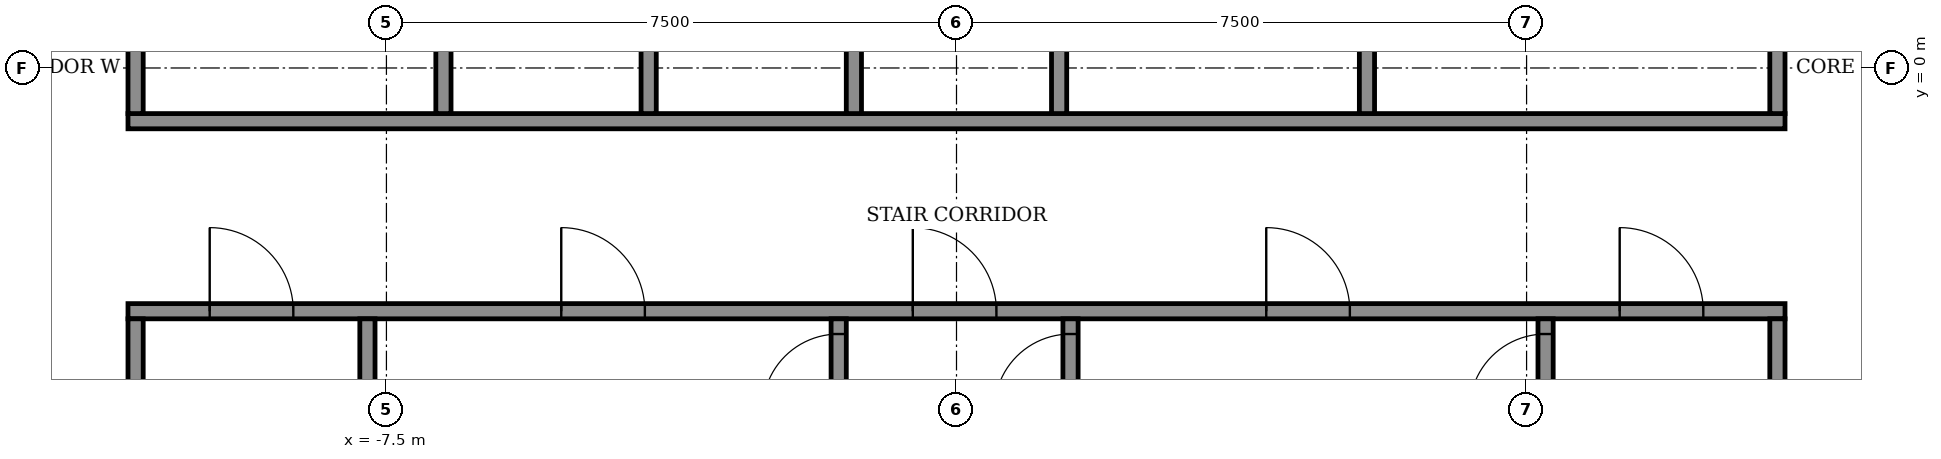
"""IFC4 building model, lengths in metres.
Left out: names, types, materials, properties, quantities, classifications, styles, units other than length and angle.
Written with IfcOpenShell. Run it as: python <this file> out.ifc"""

import sys

from ifc_helpers import new_model, si_unit, direction, frame, frame_2d, origin, place, context, subcontext, project, spatial, rectangle, extrude, element, fill, save


model = new_model("IFC4")
c1 = context("Model", 3, precision=1e-05, world=origin(), true_north=direction((0.0, 1.0)))
c2 = subcontext(c1, "Body", "Model", "MODEL_VIEW")
j1 = project(units=[si_unit("LENGTHUNIT", "METRE"), si_unit("PLANEANGLEUNIT", "RADIAN")], contexts=[c1])
p1 = place(None, origin())
s1 = spatial("IfcSite", under=j1, at=p1, CompositionType="ELEMENT")
p2 = place(p1, origin())
s2 = spatial("IfcBuilding", under=s1, at=p2, CompositionType="ELEMENT")
p3 = place(p2, frame((0.0, 0.0, 268.1)))
s3 = spatial("IfcBuildingStorey", under=s2, at=p3, CompositionType="ELEMENT", Elevation=268.1)
p4 = place(p3, frame((-10.9, -3.2, 0.0), z_axis=(0.0, 0.0, 1.0), x_axis=(1.0, 0.0, 0.0)))
e1 = element("IfcWall", 1, at=p4, inside=s3, PredefinedType="SHEAR", context=c2, shape_type="SweptSolid", body=[
    extrude(rectangle(XDim=21.8, YDim=0.2, at=frame_2d((10.9, 0.0))), origin(), (0.0, 0.0, 1.0), 3.05),
])
p5 = place(p4, frame((1.075, 0.0, 0.0)))
e2 = element("IfcOpeningElement", 2, at=p5, cuts=e1, PredefinedType="OPENING", context=c2, shape_type="SweptSolid", body=[
    extrude(rectangle(XDim=1.1, YDim=2.1, at=frame_2d((0.55, 1.05))), frame((0.0, 0.11, 0.0), z_axis=(0.0, -1.0, 0.0), x_axis=(1.0, 0.0, 0.0)), (0.0, 0.0, 1.0), 0.22),
])
p6 = place(p4, frame((10.325, 0.0, 0.0)))
e3 = element("IfcOpeningElement", 3, at=p6, cuts=e1, PredefinedType="OPENING", context=c2, shape_type="SweptSolid", body=[
    extrude(rectangle(XDim=1.1, YDim=2.1, at=frame_2d((0.55, 1.05))), frame((0.0, 0.11, 0.0), z_axis=(0.0, -1.0, 0.0), x_axis=(1.0, 0.0, 0.0)), (0.0, 0.0, 1.0), 0.22),
])
p7 = place(p4, frame((19.625, 0.0, 0.0)))
e4 = element("IfcOpeningElement", 4, at=p7, cuts=e1, PredefinedType="OPENING", context=c2, shape_type="SweptSolid", body=[
    extrude(rectangle(XDim=1.1, YDim=2.1, at=frame_2d((0.55, 1.05))), frame((0.0, 0.11, 0.0), z_axis=(0.0, -1.0, 0.0), x_axis=(1.0, 0.0, 0.0)), (0.0, 0.0, 1.0), 0.22),
])
p8 = place(p4, frame((5.7, 0.0, 0.0)))
e5 = element("IfcOpeningElement", 5, at=p8, cuts=e1, PredefinedType="OPENING", context=c2, shape_type="SweptSolid", body=[
    extrude(rectangle(XDim=1.1, YDim=2.1, at=frame_2d((0.55, 1.05))), frame((0.0, 0.11, 0.0), z_axis=(0.0, -1.0, 0.0), x_axis=(1.0, 0.0, 0.0)), (0.0, 0.0, 1.0), 0.22),
])
p9 = place(p4, frame((14.975, 0.0, 0.0)))
e6 = element("IfcOpeningElement", 6, at=p9, cuts=e1, PredefinedType="OPENING", context=c2, shape_type="SweptSolid", body=[
    extrude(rectangle(XDim=1.1, YDim=2.1, at=frame_2d((0.55, 1.05))), frame((0.0, 0.11, 0.0), z_axis=(0.0, -1.0, 0.0), x_axis=(1.0, 0.0, 0.0)), (0.0, 0.0, 1.0), 0.22),
])
p10 = place(p3, frame((-10.9, -0.7, 0.0), z_axis=(0.0, 0.0, 1.0), x_axis=(1.0, 0.0, 0.0)))
e7 = element("IfcWall", 7, at=p10, inside=s3, PredefinedType="SHEAR", context=c2, shape_type="SweptSolid", body=[
    extrude(rectangle(XDim=21.8, YDim=0.2, at=frame_2d((10.9, 0.0))), origin(), (0.0, 0.0, 1.0), 3.05),
])
for number, where, z_axis, x_axis in (
    (8, (-10.8, -10.8, 0.0), (0.0, 0.0, 1.0), (0.0, 1.0, 0.0)),
    (9, (-7.75, -10.8, 0.0), (0.0, 0.0, 1.0), (0.0, 1.0, 0.0)),
):
    element("IfcWall", number, at=place(p3, frame(where, z_axis=z_axis, x_axis=x_axis)), inside=s3, PredefinedType="SHEAR", context=c2, shape_type="SweptSolid", body=[
        extrude(rectangle(XDim=7.5, YDim=0.2, at=frame_2d((3.75, 0.0))), origin(), (0.0, 0.0, 1.0), 3.05),
    ])
p11 = place(p3, frame((-1.55, -10.8, 0.0), z_axis=(0.0, 0.0, 1.0), x_axis=(0.0, 1.0, 0.0)))
e10 = element("IfcWall", 10, at=p11, inside=s3, PredefinedType="SHEAR", context=c2, shape_type="SweptSolid", body=[
    extrude(rectangle(XDim=7.5, YDim=0.2, at=frame_2d((3.75, 0.0))), origin(), (0.0, 0.0, 1.0), 3.05),
])
p12 = place(p11, frame((6.3, 0.0, 0.0)))
e11 = element("IfcOpeningElement", 11, at=p12, cuts=e10, PredefinedType="OPENING", context=c2, shape_type="SweptSolid", body=[
    extrude(rectangle(XDim=1.0, YDim=2.1, at=frame_2d((0.5, 1.05))), frame((0.0, 0.11, 0.0), z_axis=(0.0, -1.0, 0.0), x_axis=(1.0, 0.0, 0.0)), (0.0, 0.0, 1.0), 0.22),
])
p13 = place(p3, frame((1.5, -10.8, 0.0), z_axis=(0.0, 0.0, 1.0), x_axis=(0.0, 1.0, 0.0)))
e12 = element("IfcWall", 12, at=p13, inside=s3, PredefinedType="SHEAR", context=c2, shape_type="SweptSolid", body=[
    extrude(rectangle(XDim=7.5, YDim=0.2, at=frame_2d((3.75, 0.0))), origin(), (0.0, 0.0, 1.0), 3.05),
])
p14 = place(p13, frame((6.3, 0.0, 0.0)))
e13 = element("IfcOpeningElement", 13, at=p14, cuts=e12, PredefinedType="OPENING", context=c2, shape_type="SweptSolid", body=[
    extrude(rectangle(XDim=1.0, YDim=2.1, at=frame_2d((0.5, 1.05))), frame((0.0, 0.11, 0.0), z_axis=(0.0, -1.0, 0.0), x_axis=(1.0, 0.0, 0.0)), (0.0, 0.0, 1.0), 0.22),
])
p15 = place(p3, frame((7.75, -10.8, 0.0), z_axis=(0.0, 0.0, 1.0), x_axis=(0.0, 1.0, 0.0)))
e14 = element("IfcWall", 14, at=p15, inside=s3, PredefinedType="SHEAR", context=c2, shape_type="SweptSolid", body=[
    extrude(rectangle(XDim=7.5, YDim=0.2, at=frame_2d((3.75, 0.0))), origin(), (0.0, 0.0, 1.0), 3.05),
])
p16 = place(p15, frame((6.3, 0.0, 0.0)))
e15 = element("IfcOpeningElement", 15, at=p16, cuts=e14, PredefinedType="OPENING", context=c2, shape_type="SweptSolid", body=[
    extrude(rectangle(XDim=1.0, YDim=2.1, at=frame_2d((0.5, 1.05))), frame((0.0, 0.11, 0.0), z_axis=(0.0, -1.0, 0.0), x_axis=(1.0, 0.0, 0.0)), (0.0, 0.0, 1.0), 0.22),
])
p17 = place(p3, frame((10.8, -10.8, 0.0), z_axis=(0.0, 0.0, 1.0), x_axis=(0.0, 1.0, 0.0)))
e16 = element("IfcWall", 16, at=p17, inside=s3, PredefinedType="SHEAR", context=c2, shape_type="SweptSolid", body=[
    extrude(rectangle(XDim=7.5, YDim=0.2, at=frame_2d((3.75, 0.0))), origin(), (0.0, 0.0, 1.0), 3.05),
])
p18 = place(p3, frame((-10.8, -0.6, 0.0), z_axis=(0.0, 0.0, 1.0), x_axis=(0.0, 1.0, 0.0)))
e17 = element("IfcWall", 17, at=p18, inside=s3, PredefinedType="STANDARD", context=c2, shape_type="SweptSolid", body=[
    extrude(rectangle(XDim=2.5, YDim=0.2, at=frame_2d((1.25, 0.0))), origin(), (0.0, 0.0, 1.0), 3.05),
])
for number, where, z_axis, x_axis in (
    (18, (-6.75, -0.6, 0.0), (0.0, 0.0, 1.0), (0.0, 1.0, 0.0)),
    (19, (-4.05, -0.6, 0.0), (0.0, 0.0, 1.0), (0.0, 1.0, 0.0)),
    (20, (-1.35, -0.6, 0.0), (0.0, 0.0, 1.0), (0.0, 1.0, 0.0)),
    (21, (1.35, -0.6, 0.0), (0.0, 0.0, 1.0), (0.0, 1.0, 0.0)),
):
    element("IfcWall", number, at=place(p3, frame(where, z_axis=z_axis, x_axis=x_axis)), inside=s3, PredefinedType="SHEAR", context=c2, shape_type="SweptSolid", body=[
        extrude(rectangle(XDim=2.5, YDim=0.2, at=frame_2d((1.25, 0.0))), origin(), (0.0, 0.0, 1.0), 3.05),
    ])
for number, where, z_axis, x_axis in (
    (22, (5.4, -0.6, 0.0), (0.0, 0.0, 1.0), (0.0, 1.0, 0.0)),
    (23, (10.8, -0.6, 0.0), (0.0, 0.0, 1.0), (0.0, 1.0, 0.0)),
):
    element("IfcWall", number, at=place(p3, frame(where, z_axis=z_axis, x_axis=x_axis)), inside=s3, PredefinedType="STANDARD", context=c2, shape_type="SweptSolid", body=[
        extrude(rectangle(XDim=2.5, YDim=0.2, at=frame_2d((1.25, 0.0))), origin(), (0.0, 0.0, 1.0), 3.05),
    ])
p19 = place(p5, origin())
e24 = element("IfcDoor", 24, at=p19, inside=s3, OperationType="SINGLE_SWING_RIGHT", PredefinedType="DOOR", context=c2, shape_type="SweptSolid", body=[
    extrude(rectangle(XDim=1.1, YDim=2.1, at=frame_2d((0.55, 1.05))), frame((0.0, 0.025, 0.0), z_axis=(0.0, -1.0, 0.0), x_axis=(1.0, 0.0, 0.0)), (0.0, 0.0, 1.0), 0.05),
])
fill(e2, e24)
p20 = place(p6, origin())
e25 = element("IfcDoor", 25, at=p20, inside=s3, OperationType="SINGLE_SWING_RIGHT", PredefinedType="DOOR", context=c2, shape_type="SweptSolid", body=[
    extrude(rectangle(XDim=1.1, YDim=2.1, at=frame_2d((0.55, 1.05))), frame((0.0, 0.025, 0.0), z_axis=(0.0, -1.0, 0.0), x_axis=(1.0, 0.0, 0.0)), (0.0, 0.0, 1.0), 0.05),
])
fill(e3, e25)
p21 = place(p7, origin())
e26 = element("IfcDoor", 26, at=p21, inside=s3, OperationType="SINGLE_SWING_RIGHT", PredefinedType="DOOR", context=c2, shape_type="SweptSolid", body=[
    extrude(rectangle(XDim=1.1, YDim=2.1, at=frame_2d((0.55, 1.05))), frame((0.0, 0.025, 0.0), z_axis=(0.0, -1.0, 0.0), x_axis=(1.0, 0.0, 0.0)), (0.0, 0.0, 1.0), 0.05),
])
fill(e4, e26)
p22 = place(p8, origin())
e27 = element("IfcDoor", 27, at=p22, inside=s3, OperationType="SINGLE_SWING_LEFT", PredefinedType="DOOR", context=c2, shape_type="SweptSolid", body=[
    extrude(rectangle(XDim=1.1, YDim=2.1, at=frame_2d((0.55, 1.05))), frame((0.0, 0.025, 0.0), z_axis=(0.0, -1.0, 0.0), x_axis=(1.0, 0.0, 0.0)), (0.0, 0.0, 1.0), 0.05),
])
fill(e5, e27)
p23 = place(p9, origin())
e28 = element("IfcDoor", 28, at=p23, inside=s3, OperationType="SINGLE_SWING_LEFT", PredefinedType="DOOR", context=c2, shape_type="SweptSolid", body=[
    extrude(rectangle(XDim=1.1, YDim=2.1, at=frame_2d((0.55, 1.05))), frame((0.0, 0.025, 0.0), z_axis=(0.0, -1.0, 0.0), x_axis=(1.0, 0.0, 0.0)), (0.0, 0.0, 1.0), 0.05),
])
fill(e6, e28)
p24 = place(p12, origin())
e29 = element("IfcDoor", 29, at=p24, inside=s3, OperationType="SINGLE_SWING_RIGHT", PredefinedType="DOOR", context=c2, shape_type="SweptSolid", body=[
    extrude(rectangle(XDim=1.0, YDim=2.1, at=frame_2d((0.5, 1.05))), frame((0.0, 0.025, 0.0), z_axis=(0.0, -1.0, 0.0), x_axis=(1.0, 0.0, 0.0)), (0.0, 0.0, 1.0), 0.05),
])
fill(e11, e29)
p25 = place(p14, origin())
e30 = element("IfcDoor", 30, at=p25, inside=s3, OperationType="SINGLE_SWING_RIGHT", PredefinedType="DOOR", context=c2, shape_type="SweptSolid", body=[
    extrude(rectangle(XDim=1.0, YDim=2.1, at=frame_2d((0.5, 1.05))), frame((0.0, 0.025, 0.0), z_axis=(0.0, -1.0, 0.0), x_axis=(1.0, 0.0, 0.0)), (0.0, 0.0, 1.0), 0.05),
])
fill(e13, e30)
p26 = place(p16, origin())
e31 = element("IfcDoor", 31, at=p26, inside=s3, OperationType="SINGLE_SWING_RIGHT", PredefinedType="DOOR", context=c2, shape_type="SweptSolid", body=[
    extrude(rectangle(XDim=1.0, YDim=2.1, at=frame_2d((0.5, 1.05))), frame((0.0, 0.025, 0.0), z_axis=(0.0, -1.0, 0.0), x_axis=(1.0, 0.0, 0.0)), (0.0, 0.0, 1.0), 0.05),
])
fill(e15, e31)
save(model, sys.argv[1])
